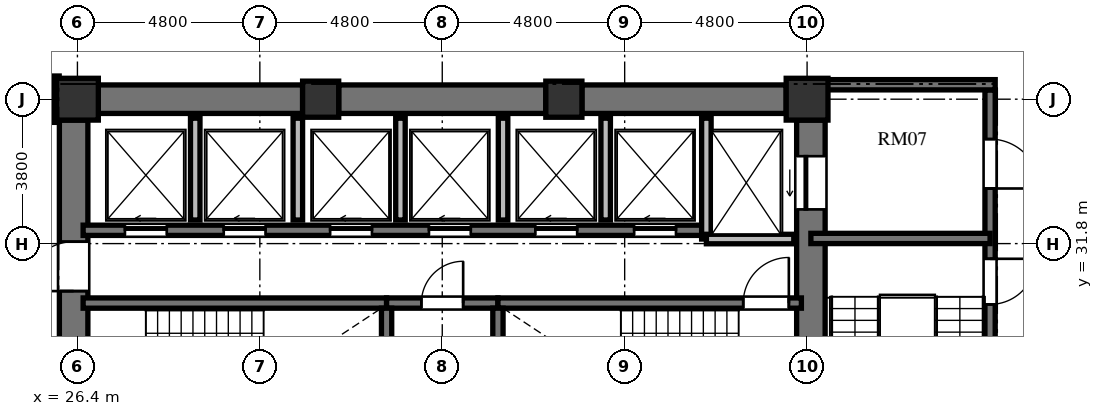
"""IFC4 building model, lengths in metres.
Left out: names, types, materials, properties, quantities, classifications, styles, units other than length and angle.
Written with IfcOpenShell. Run it as: python <this file> out.ifc"""

import sys

from ifc_helpers import new_model, si_unit, direction, frame, frame_2d, origin, origin_2d, place, context, subcontext, project, spatial, rectangle, extrude, element, fill, save


model = new_model("IFC4")
c1 = context("Model", 3, precision=1e-05, world=origin(), true_north=direction((0.0, 1.0)))
c2 = subcontext(c1, "Body", "Model", "MODEL_VIEW")
j1 = project(units=[si_unit("LENGTHUNIT", "METRE"), si_unit("PLANEANGLEUNIT", "RADIAN")], contexts=[c1])
p1 = place(None, origin())
s1 = spatial("IfcSite", under=j1, at=p1, CompositionType="ELEMENT")
p2 = place(p1, origin())
s2 = spatial("IfcBuilding", under=s1, at=p2, CompositionType="ELEMENT")
p3 = place(p2, frame((0.0, 0.0, 129.168)))
s3 = spatial("IfcBuildingStorey", under=s2, at=p3, CompositionType="ELEMENT", Elevation=129.168)
p4 = place(p3, frame((45.6, 35.6, 0.0), z_axis=(0.0, 0.0, 1.0), x_axis=(1.0, 0.0, 0.0)))
e1 = element("IfcColumn", 1, at=p4, inside=s3, PredefinedType="COLUMN", context=c2, shape_type="SweptSolid", body=[
    extrude(rectangle(XDim=1.1, YDim=1.1, at=origin_2d()), origin(), (0.0, 0.0, 1.0), 3.648),
])
for number, where, z_axis, x_axis in (
    (2, (39.2, 35.6, 0.0), (0.0, 0.0, 1.0), (1.0, 0.0, 0.0)),
    (3, (32.8, 35.6, 0.0), (0.0, 0.0, 1.0), (1.0, 0.0, 0.0)),
):
    element("IfcColumn", number, at=place(p3, frame(where, z_axis=z_axis, x_axis=x_axis)), inside=s3, PredefinedType="COLUMN", context=c2, shape_type="SweptSolid", body=[
        extrude(rectangle(XDim=0.95, YDim=0.95, at=origin_2d()), origin(), (0.0, 0.0, 1.0), 3.648),
    ])
p5 = place(p3, frame((26.4, 35.6, 0.0), z_axis=(0.0, 0.0, 1.0), x_axis=(1.0, 0.0, 0.0)))
e4 = element("IfcColumn", 4, at=p5, inside=s3, PredefinedType="COLUMN", context=c2, shape_type="SweptSolid", body=[
    extrude(rectangle(XDim=1.1, YDim=1.1, at=origin_2d()), origin(), (0.0, 0.0, 1.0), 3.648),
])
p6 = place(p3, frame((26.3, 20.95, 0.0), z_axis=(0.0, 0.0, 1.0), x_axis=(0.0, 1.0, 0.0)))
e5 = element("IfcWall", 5, at=p6, inside=s3, PredefinedType="SHEAR", context=c2, shape_type="SweptSolid", body=[
    extrude(rectangle(XDim=14.1, YDim=0.75, at=frame_2d((7.05, 0.0))), origin(), (0.0, 0.0, 1.0), 3.648),
])
p7 = place(p6, frame((6.5, 0.0, 0.0)))
e6 = element("IfcOpeningElement", 6, at=p7, cuts=e5, PredefinedType="OPENING", context=c2, shape_type="SweptSolid", body=[
    extrude(rectangle(XDim=1.2, YDim=2.15, at=frame_2d((0.6, 1.075))), frame((0.0, 0.385, 0.0), z_axis=(0.0, -1.0, 0.0), x_axis=(1.0, 0.0, 0.0)), (0.0, 0.0, 1.0), 0.77),
])
p8 = place(p6, frame((9.6, 0.0, 0.0)))
e7 = element("IfcOpeningElement", 7, at=p8, cuts=e5, PredefinedType="OPENING", context=c2, shape_type="SweptSolid", body=[
    extrude(rectangle(XDim=1.3, YDim=2.2, at=frame_2d((0.65, 1.1))), frame((0.0, 0.385, 0.0), z_axis=(0.0, -1.0, 0.0), x_axis=(1.0, 0.0, 0.0)), (0.0, 0.0, 1.0), 0.77),
])
p9 = place(p6, frame((3.26, 0.0, 0.0)))
e8 = element("IfcOpeningElement", 8, at=p9, cuts=e5, PredefinedType="OPENING", context=c2, shape_type="SweptSolid", body=[
    extrude(rectangle(XDim=1.3, YDim=2.2, at=frame_2d((0.65, 1.1))), frame((0.0, 0.385, 0.0), z_axis=(0.0, -1.0, 0.0), x_axis=(1.0, 0.0, 0.0)), (0.0, 0.0, 1.0), 0.77),
])
p10 = place(p3, frame((45.7, 20.95, 0.0), z_axis=(0.0, 0.0, 1.0), x_axis=(0.0, 1.0, 0.0)))
e9 = element("IfcWall", 9, at=p10, inside=s3, PredefinedType="SHEAR", context=c2, shape_type="SweptSolid", body=[
    extrude(rectangle(XDim=14.1, YDim=0.75, at=frame_2d((7.05, 0.0))), origin(), (0.0, 0.0, 1.0), 3.648),
])
p11 = place(p10, frame((11.75, 0.0, 0.0)))
e10 = element("IfcOpeningElement", 10, at=p11, cuts=e9, PredefinedType="OPENING", context=c2, shape_type="SweptSolid", body=[
    extrude(rectangle(XDim=1.4, YDim=2.3, at=frame_2d((0.7, 1.15))), frame((0.0, 0.385, 0.0), z_axis=(0.0, -1.0, 0.0), x_axis=(1.0, 0.0, 0.0)), (0.0, 0.0, 1.0), 0.77),
])
p12 = place(p10, frame((0.95, 0.0, 0.0)))
e11 = element("IfcOpeningElement", 11, at=p12, cuts=e9, PredefinedType="OPENING", context=c2, shape_type="SweptSolid", body=[
    extrude(rectangle(XDim=1.4, YDim=2.3, at=frame_2d((0.7, 1.15))), frame((0.0, 0.385, 0.0), z_axis=(0.0, -1.0, 0.0), x_axis=(1.0, 0.0, 0.0)), (0.0, 0.0, 1.0), 0.77),
])
p13 = place(p3, frame((26.95, 35.6, 0.0), z_axis=(0.0, 0.0, 1.0), x_axis=(1.0, 0.0, 0.0)))
e12 = element("IfcWall", 12, at=p13, inside=s3, PredefinedType="SHEAR", context=c2, shape_type="SweptSolid", body=[
    extrude(rectangle(XDim=5.375, YDim=0.75, at=frame_2d((2.688, 0.0))), origin(), (0.0, 0.0, 1.0), 3.648),
])
p14 = place(p3, frame((33.275, 35.6, 0.0), z_axis=(0.0, 0.0, 1.0), x_axis=(1.0, 0.0, 0.0)))
e13 = element("IfcWall", 13, at=p14, inside=s3, PredefinedType="SHEAR", context=c2, shape_type="SweptSolid", body=[
    extrude(rectangle(XDim=5.45, YDim=0.75, at=frame_2d((2.725, 0.0))), origin(), (0.0, 0.0, 1.0), 3.648),
])
p15 = place(p3, frame((39.675, 35.6, 0.0), z_axis=(0.0, 0.0, 1.0), x_axis=(1.0, 0.0, 0.0)))
e14 = element("IfcWall", 14, at=p15, inside=s3, PredefinedType="SHEAR", context=c2, shape_type="SweptSolid", body=[
    extrude(rectangle(XDim=5.375, YDim=0.75, at=frame_2d((2.688, 0.0))), origin(), (0.0, 0.0, 1.0), 3.648),
])
p16 = place(p3, frame((26.55, 30.235, 0.0), z_axis=(0.0, 0.0, 1.0), x_axis=(1.0, 0.0, 0.0)))
e15 = element("IfcWall", 15, at=p16, inside=s3, PredefinedType="SHEAR", context=c2, shape_type="SweptSolid", body=[
    extrude(rectangle(XDim=7.985, YDim=0.27, at=frame_2d((3.992, 0.0))), origin(), (0.0, 0.0, 1.0), 3.648),
])
p17 = place(p3, frame((34.535, 30.235, 0.0), z_axis=(0.0, 0.0, 1.0), x_axis=(1.0, 0.0, 0.0)))
e16 = element("IfcWall", 16, at=p17, inside=s3, PredefinedType="SHEAR", context=c2, shape_type="SweptSolid", body=[
    extrude(rectangle(XDim=2.93, YDim=0.27, at=frame_2d((1.465, 0.0))), origin(), (0.0, 0.0, 1.0), 3.648),
])
p18 = place(p17, frame((0.915, 0.0, 0.0)))
e17 = element("IfcOpeningElement", 17, at=p18, cuts=e16, PredefinedType="OPENING", context=c2, shape_type="SweptSolid", body=[
    extrude(rectangle(XDim=1.1, YDim=2.15, at=frame_2d((0.55, 1.075))), frame((0.0, 0.145, 0.0), z_axis=(0.0, -1.0, 0.0), x_axis=(1.0, 0.0, 0.0)), (0.0, 0.0, 1.0), 0.29),
])
p19 = place(p3, frame((37.465, 30.235, 0.0), z_axis=(0.0, 0.0, 1.0), x_axis=(1.0, 0.0, 0.0)))
e18 = element("IfcWall", 18, at=p19, inside=s3, PredefinedType="SHEAR", context=c2, shape_type="SweptSolid", body=[
    extrude(rectangle(XDim=7.985, YDim=0.27, at=frame_2d((3.992, 0.0))), origin(), (0.0, 0.0, 1.0), 3.648),
])
p20 = place(p19, frame((6.455, 0.0, 0.0)))
e19 = element("IfcOpeningElement", 19, at=p20, cuts=e18, PredefinedType="OPENING", context=c2, shape_type="SweptSolid", body=[
    extrude(rectangle(XDim=1.2, YDim=2.15, at=frame_2d((0.6, 1.075))), frame((0.0, 0.145, 0.0), z_axis=(0.0, -1.0, 0.0), x_axis=(1.0, 0.0, 0.0)), (0.0, 0.0, 1.0), 0.29),
])
for number, where, z_axis, x_axis in (
    (20, (34.535, 26.02, 0.0), (0.0, 0.0, 1.0), (0.0, 1.0, 0.0)),
    (21, (37.465, 26.02, 0.0), (0.0, 0.0, 1.0), (0.0, 1.0, 0.0)),
):
    element("IfcWall", number, at=place(p3, frame(where, z_axis=z_axis, x_axis=x_axis)), inside=s3, PredefinedType="SHEAR", context=c2, shape_type="SweptSolid", body=[
        extrude(rectangle(XDim=4.08, YDim=0.27, at=frame_2d((2.04, 0.0))), origin(), (0.0, 0.0, 1.0), 3.648),
    ])
p21 = place(p3, frame((26.55, 32.15, 0.0), z_axis=(0.0, 0.0, 1.0), x_axis=(1.0, 0.0, 0.0)))
e22 = element("IfcWall", 22, at=p21, inside=s3, PredefinedType="SHEAR", context=c2, shape_type="SweptSolid", body=[
    extrude(rectangle(XDim=16.4, YDim=0.27, at=frame_2d((8.2, 0.0))), origin(), (0.0, 0.0, 1.0), 3.648),
])
p22 = place(p21, frame((1.1, 0.0, 0.0)))
e23 = element("IfcOpeningElement", 23, at=p22, cuts=e22, PredefinedType="OPENING", context=c2, shape_type="SweptSolid", body=[
    extrude(rectangle(XDim=1.1, YDim=2.2, at=frame_2d((0.55, 1.1))), frame((0.0, 0.145, 0.0), z_axis=(0.0, -1.0, 0.0), x_axis=(1.0, 0.0, 0.0)), (0.0, 0.0, 1.0), 0.29),
])
p23 = place(p21, frame((3.7, 0.0, 0.0)))
e24 = element("IfcOpeningElement", 24, at=p23, cuts=e22, PredefinedType="OPENING", context=c2, shape_type="SweptSolid", body=[
    extrude(rectangle(XDim=1.1, YDim=2.2, at=frame_2d((0.55, 1.1))), frame((0.0, 0.145, 0.0), z_axis=(0.0, -1.0, 0.0), x_axis=(1.0, 0.0, 0.0)), (0.0, 0.0, 1.0), 0.29),
])
p24 = place(p21, frame((6.5, 0.0, 0.0)))
e25 = element("IfcOpeningElement", 25, at=p24, cuts=e22, PredefinedType="OPENING", context=c2, shape_type="SweptSolid", body=[
    extrude(rectangle(XDim=1.1, YDim=2.2, at=frame_2d((0.55, 1.1))), frame((0.0, 0.145, 0.0), z_axis=(0.0, -1.0, 0.0), x_axis=(1.0, 0.0, 0.0)), (0.0, 0.0, 1.0), 0.29),
])
p25 = place(p21, frame((9.1, 0.0, 0.0)))
e26 = element("IfcOpeningElement", 26, at=p25, cuts=e22, PredefinedType="OPENING", context=c2, shape_type="SweptSolid", body=[
    extrude(rectangle(XDim=1.1, YDim=2.2, at=frame_2d((0.55, 1.1))), frame((0.0, 0.145, 0.0), z_axis=(0.0, -1.0, 0.0), x_axis=(1.0, 0.0, 0.0)), (0.0, 0.0, 1.0), 0.29),
])
p26 = place(p21, frame((11.9, 0.0, 0.0)))
e27 = element("IfcOpeningElement", 27, at=p26, cuts=e22, PredefinedType="OPENING", context=c2, shape_type="SweptSolid", body=[
    extrude(rectangle(XDim=1.1, YDim=2.2, at=frame_2d((0.55, 1.1))), frame((0.0, 0.145, 0.0), z_axis=(0.0, -1.0, 0.0), x_axis=(1.0, 0.0, 0.0)), (0.0, 0.0, 1.0), 0.29),
])
p27 = place(p21, frame((14.5, 0.0, 0.0)))
e28 = element("IfcOpeningElement", 28, at=p27, cuts=e22, PredefinedType="OPENING", context=c2, shape_type="SweptSolid", body=[
    extrude(rectangle(XDim=1.1, YDim=2.2, at=frame_2d((0.55, 1.1))), frame((0.0, 0.145, 0.0), z_axis=(0.0, -1.0, 0.0), x_axis=(1.0, 0.0, 0.0)), (0.0, 0.0, 1.0), 0.29),
])
p28 = place(p3, frame((42.95, 31.92, 0.0), z_axis=(0.0, 0.0, 1.0), x_axis=(0.0, 1.0, 0.0)))
e29 = element("IfcWall", 29, at=p28, inside=s3, PredefinedType="SOLIDWALL", context=c2, shape_type="SweptSolid", body=[
    extrude(rectangle(XDim=3.18, YDim=0.25, at=frame_2d((1.59, 0.0))), origin(), (0.0, 0.0, 1.0), 3.198),
])
p29 = place(p3, frame((42.95, 31.92, 0.0), z_axis=(0.0, 0.0, 1.0), x_axis=(1.0, 0.0, 0.0)))
e30 = element("IfcWall", 30, at=p29, inside=s3, PredefinedType="SOLIDWALL", context=c2, shape_type="SweptSolid", body=[
    extrude(rectangle(XDim=2.3, YDim=0.25, at=frame_2d((1.15, 0.0))), origin(), (0.0, 0.0, 1.0), 3.198),
])
for number, where, z_axis, x_axis in (
    (31, (29.5, 32.42, 0.0), (0.0, 0.0, 1.0), (0.0, 1.0, 0.0)),
    (32, (32.2, 32.42, 0.0), (0.0, 0.0, 1.0), (0.0, 1.0, 0.0)),
    (33, (34.9, 32.42, 0.0), (0.0, 0.0, 1.0), (0.0, 1.0, 0.0)),
    (34, (37.6, 32.42, 0.0), (0.0, 0.0, 1.0), (0.0, 1.0, 0.0)),
    (35, (40.3, 32.42, 0.0), (0.0, 0.0, 1.0), (0.0, 1.0, 0.0)),
):
    element("IfcWall", number, at=place(p3, frame(where, z_axis=z_axis, x_axis=x_axis)), inside=s3, PredefinedType="SOLIDWALL", context=c2, shape_type="SweptSolid", body=[
        extrude(rectangle(XDim=2.68, YDim=0.25, at=frame_2d((1.34, 0.0))), origin(), (0.0, 0.0, 1.0), 3.198),
    ])
p30 = place(p3, frame((50.415, 35.845, 0.0), z_axis=(0.0, 0.0, 1.0), x_axis=(0.0, -1.0, 0.0)))
e36 = element("IfcWall", 36, at=p30, inside=s3, PredefinedType="SHEAR", context=c2, shape_type="SweptSolid", body=[
    extrude(rectangle(XDim=15.825, YDim=0.27, at=frame_2d((7.913, 0.0))), origin(), (0.0, 0.0, 1.0), 3.648),
])
p31 = place(p30, frame((4.445, 0.0, 0.0)))
e37 = element("IfcOpeningElement", 37, at=p31, cuts=e36, PredefinedType="OPENING", context=c2, shape_type="SweptSolid", body=[
    extrude(rectangle(XDim=1.2, YDim=2.15, at=frame_2d((0.6, 1.075))), frame((0.0, 0.145, 0.0), z_axis=(0.0, -1.0, 0.0), x_axis=(1.0, 0.0, 0.0)), (0.0, 0.0, 1.0), 0.29),
])
p32 = place(p30, frame((1.295, 0.0, 0.0)))
e38 = element("IfcOpeningElement", 38, at=p32, cuts=e36, PredefinedType="OPENING", context=c2, shape_type="SweptSolid", body=[
    extrude(rectangle(XDim=1.3, YDim=2.2, at=frame_2d((0.65, 1.1))), frame((0.0, 0.145, 0.0), z_axis=(0.0, -1.0, 0.0), x_axis=(1.0, 0.0, 0.0)), (0.0, 0.0, 1.0), 0.29),
])
p33 = place(p30, frame((13.095, 0.0, 0.0)))
e39 = element("IfcOpeningElement", 39, at=p33, cuts=e36, PredefinedType="OPENING", context=c2, shape_type="SweptSolid", body=[
    extrude(rectangle(XDim=1.3, YDim=2.2, at=frame_2d((0.65, 1.1))), frame((0.0, 0.145, 0.0), z_axis=(0.0, -1.0, 0.0), x_axis=(1.0, 0.0, 0.0)), (0.0, 0.0, 1.0), 0.29),
])
p34 = place(p3, frame((46.075, 35.98, 0.0), z_axis=(0.0, 0.0, 1.0), x_axis=(1.0, 0.0, 0.0)))
e40 = element("IfcWall", 40, at=p34, inside=s3, PredefinedType="SHEAR", context=c2, shape_type="SweptSolid", body=[
    extrude(rectangle(XDim=4.475, YDim=0.27, at=frame_2d((2.238, 0.0))), origin(), (0.0, 0.0, 1.0), 3.648),
])
p35 = place(p3, frame((45.7, 31.935, 0.0), z_axis=(0.0, 0.0, 1.0), x_axis=(1.0, 0.0, 0.0)))
e41 = element("IfcWall", 41, at=p35, inside=s3, PredefinedType="SHEAR", context=c2, shape_type="SweptSolid", body=[
    extrude(rectangle(XDim=4.715, YDim=0.27, at=frame_2d((2.357, 0.0))), origin(), (0.0, 0.0, 1.0), 3.648),
])
p36 = place(p3, frame((25.83, 36.21, 0.0), z_axis=(0.0, 0.0, 1.0), x_axis=(0.0, -1.0, 0.0)))
e42 = element("IfcWall", 42, at=p36, inside=s3, PredefinedType="PARTITIONING", context=c2, shape_type="SweptSolid", body=[
    extrude(rectangle(XDim=1.22, YDim=0.18, at=frame_2d((0.61, 0.0))), origin(), (0.0, 0.0, 1.0), 3.198),
])
p37 = place(p20, origin())
e43 = element("IfcDoor", 43, at=p37, inside=s3, OperationType="SINGLE_SWING_RIGHT", PredefinedType="DOOR", context=c2, shape_type="SweptSolid", body=[
    extrude(rectangle(XDim=1.2, YDim=2.15, at=frame_2d((0.6, 1.075))), frame((0.0, 0.025, 0.0), z_axis=(0.0, -1.0, 0.0), x_axis=(1.0, 0.0, 0.0)), (0.0, 0.0, 1.0), 0.05),
])
fill(e19, e43)
p38 = place(p18, origin())
e44 = element("IfcDoor", 44, at=p38, inside=s3, OperationType="SINGLE_SWING_RIGHT", PredefinedType="DOOR", context=c2, shape_type="SweptSolid", body=[
    extrude(rectangle(XDim=1.1, YDim=2.15, at=frame_2d((0.55, 1.075))), frame((0.0, 0.025, 0.0), z_axis=(0.0, -1.0, 0.0), x_axis=(1.0, 0.0, 0.0)), (0.0, 0.0, 1.0), 0.05),
])
fill(e17, e44)
p39 = place(p8, origin())
e45 = element("IfcDoor", 45, at=p39, inside=s3, OperationType="SINGLE_SWING_LEFT", PredefinedType="DOOR", context=c2, shape_type="SweptSolid", body=[
    extrude(rectangle(XDim=1.3, YDim=2.2, at=frame_2d((0.65, 1.1))), frame((0.0, 0.025, 0.0), z_axis=(0.0, -1.0, 0.0), x_axis=(1.0, 0.0, 0.0)), (0.0, 0.0, 1.0), 0.05),
])
fill(e7, e45)
p40 = place(p22, origin())
e46 = element("IfcDoor", 46, at=p40, inside=s3, OperationType="SLIDING_TO_LEFT", PredefinedType="DOOR", context=c2, shape_type="SweptSolid", body=[
    extrude(rectangle(XDim=1.1, YDim=2.2, at=frame_2d((0.55, 1.1))), frame((0.0, 0.025, 0.0), z_axis=(0.0, -1.0, 0.0), x_axis=(1.0, 0.0, 0.0)), (0.0, 0.0, 1.0), 0.05),
])
fill(e23, e46)
p41 = place(p23, origin())
e47 = element("IfcDoor", 47, at=p41, inside=s3, OperationType="SLIDING_TO_LEFT", PredefinedType="DOOR", context=c2, shape_type="SweptSolid", body=[
    extrude(rectangle(XDim=1.1, YDim=2.2, at=frame_2d((0.55, 1.1))), frame((0.0, 0.025, 0.0), z_axis=(0.0, -1.0, 0.0), x_axis=(1.0, 0.0, 0.0)), (0.0, 0.0, 1.0), 0.05),
])
fill(e24, e47)
p42 = place(p24, origin())
e48 = element("IfcDoor", 48, at=p42, inside=s3, OperationType="SLIDING_TO_LEFT", PredefinedType="DOOR", context=c2, shape_type="SweptSolid", body=[
    extrude(rectangle(XDim=1.1, YDim=2.2, at=frame_2d((0.55, 1.1))), frame((0.0, 0.025, 0.0), z_axis=(0.0, -1.0, 0.0), x_axis=(1.0, 0.0, 0.0)), (0.0, 0.0, 1.0), 0.05),
])
fill(e25, e48)
p43 = place(p25, origin())
e49 = element("IfcDoor", 49, at=p43, inside=s3, OperationType="SLIDING_TO_LEFT", PredefinedType="DOOR", context=c2, shape_type="SweptSolid", body=[
    extrude(rectangle(XDim=1.1, YDim=2.2, at=frame_2d((0.55, 1.1))), frame((0.0, 0.025, 0.0), z_axis=(0.0, -1.0, 0.0), x_axis=(1.0, 0.0, 0.0)), (0.0, 0.0, 1.0), 0.05),
])
fill(e26, e49)
p44 = place(p26, origin())
e50 = element("IfcDoor", 50, at=p44, inside=s3, OperationType="SLIDING_TO_LEFT", PredefinedType="DOOR", context=c2, shape_type="SweptSolid", body=[
    extrude(rectangle(XDim=1.1, YDim=2.2, at=frame_2d((0.55, 1.1))), frame((0.0, 0.025, 0.0), z_axis=(0.0, -1.0, 0.0), x_axis=(1.0, 0.0, 0.0)), (0.0, 0.0, 1.0), 0.05),
])
fill(e27, e50)
p45 = place(p27, origin())
e51 = element("IfcDoor", 51, at=p45, inside=s3, OperationType="SLIDING_TO_LEFT", PredefinedType="DOOR", context=c2, shape_type="SweptSolid", body=[
    extrude(rectangle(XDim=1.1, YDim=2.2, at=frame_2d((0.55, 1.1))), frame((0.0, 0.025, 0.0), z_axis=(0.0, -1.0, 0.0), x_axis=(1.0, 0.0, 0.0)), (0.0, 0.0, 1.0), 0.05),
])
fill(e28, e51)
p46 = place(p11, origin())
e52 = element("IfcDoor", 52, at=p46, inside=s3, OperationType="SLIDING_TO_LEFT", PredefinedType="DOOR", context=c2, shape_type="SweptSolid", body=[
    extrude(rectangle(XDim=1.4, YDim=2.3, at=frame_2d((0.7, 1.15))), frame((0.0, 0.025, 0.0), z_axis=(0.0, -1.0, 0.0), x_axis=(1.0, 0.0, 0.0)), (0.0, 0.0, 1.0), 0.05),
])
fill(e10, e52)
p47 = place(p31, origin())
e53 = element("IfcDoor", 53, at=p47, inside=s3, OperationType="SINGLE_SWING_LEFT", PredefinedType="DOOR", context=c2, shape_type="SweptSolid", body=[
    extrude(rectangle(XDim=1.2, YDim=2.15, at=frame_2d((0.6, 1.075))), frame((0.0, 0.025, 0.0), z_axis=(0.0, -1.0, 0.0), x_axis=(1.0, 0.0, 0.0)), (0.0, 0.0, 1.0), 0.05),
])
fill(e37, e53)
p48 = place(p32, origin())
e54 = element("IfcDoor", 54, at=p48, inside=s3, OperationType="SINGLE_SWING_RIGHT", PredefinedType="DOOR", context=c2, shape_type="SweptSolid", body=[
    extrude(rectangle(XDim=1.3, YDim=2.2, at=frame_2d((0.65, 1.1))), frame((0.0, 0.025, 0.0), z_axis=(0.0, -1.0, 0.0), x_axis=(1.0, 0.0, 0.0)), (0.0, 0.0, 1.0), 0.05),
])
fill(e38, e54)
save(model, sys.argv[1])
